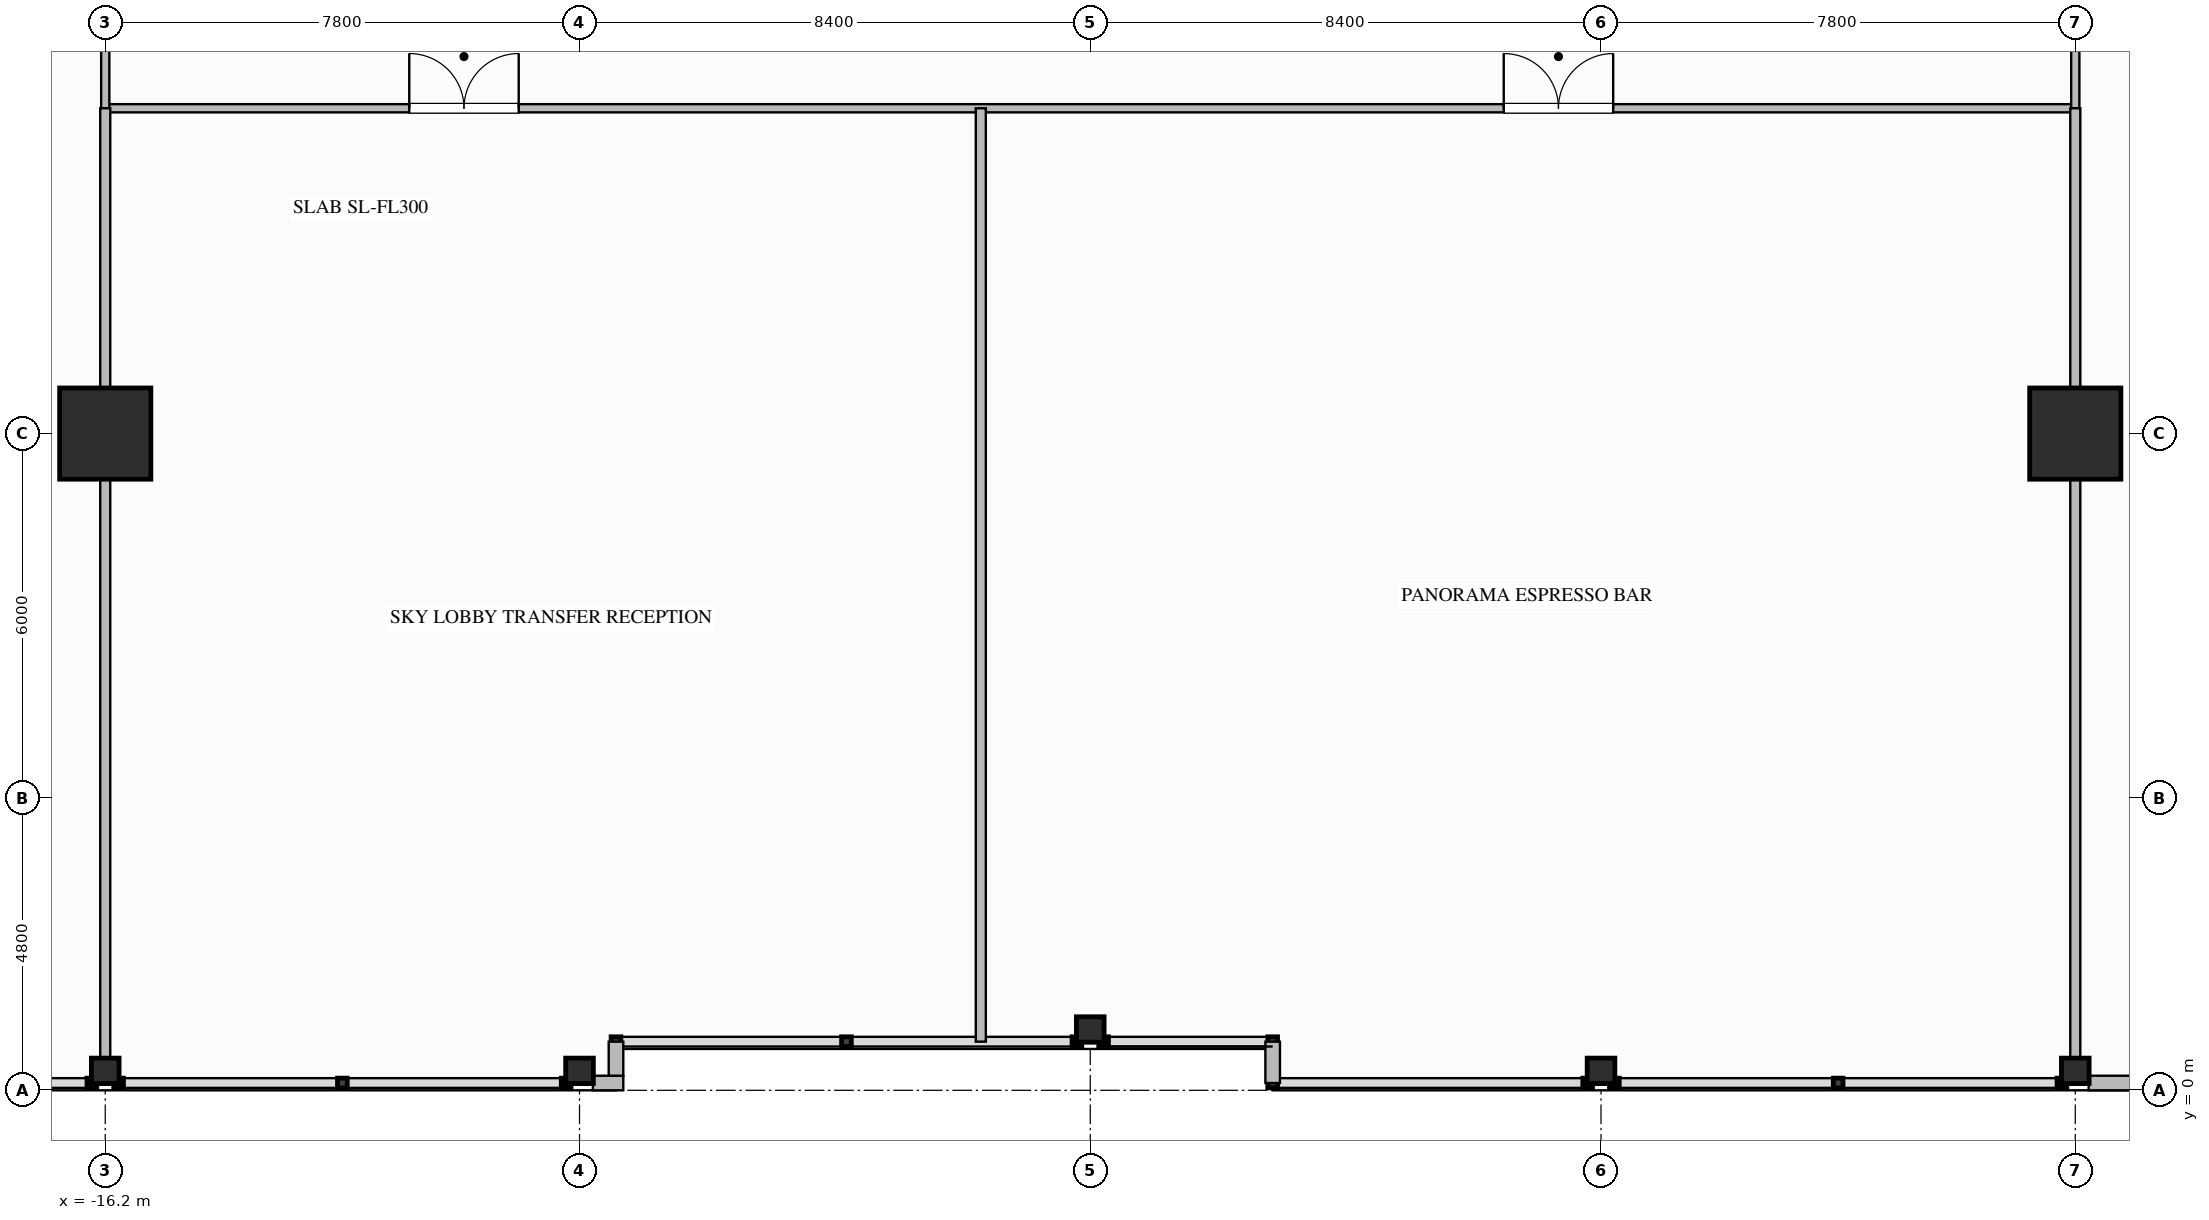
"""IFC4 building model, lengths in metres.
Left out: names, types, materials, properties, quantities, classifications, styles, units other than length and angle.
Written with IfcOpenShell. Run it as: python <this file> out.ifc"""

import sys

from ifc_helpers import new_model, si_unit, direction, frame, frame_2d, origin, origin_2d, place, context, subcontext, project, spatial, rectangle, i_section, extrude, element, fill, save


model = new_model("IFC4")
c1 = context("Model", 3, precision=1e-05, world=origin(), true_north=direction((0.0, 1.0)))
c2 = subcontext(c1, "Body", "Model", "MODEL_VIEW")
j1 = project(units=[si_unit("LENGTHUNIT", "METRE"), si_unit("PLANEANGLEUNIT", "RADIAN")], contexts=[c1])
p1 = place(None, origin())
s1 = spatial("IfcSite", under=j1, at=p1, CompositionType="ELEMENT")
p2 = place(p1, origin())
s2 = spatial("IfcBuilding", under=s1, at=p2, CompositionType="ELEMENT")
p3 = place(p2, frame((0.0, 0.0, 87.2)))
s3 = spatial("IfcBuildingStorey", under=s2, at=p3, CompositionType="ELEMENT", Elevation=87.2)
for number, where, z_axis, x_axis in (
    (1, (-16.2, 10.8, 0.0), (0.0, 0.0, 1.0), (1.0, 0.0, 0.0)),
    (2, (16.2, 10.8, 0.0), (0.0, 0.0, 1.0), (1.0, 0.0, 0.0)),
):
    element("IfcColumn", number, at=place(p3, frame(where, z_axis=z_axis, x_axis=x_axis)), inside=s3, PredefinedType="COLUMN", context=c2, shape_type="SweptSolid", body=[
        extrude(rectangle(XDim=1.5, YDim=1.5, at=origin_2d()), origin(), (0.0, 0.0, 1.0), 4.6),
    ])
for number, where, z_axis, x_axis in (
    (3, (-16.2, 0.32, 0.0), (0.0, 0.0, 1.0), (0.0, 1.0, 0.0)),
    (4, (-8.4, 0.32, 0.0), (0.0, 0.0, 1.0), (0.0, 1.0, 0.0)),
    (5, (0.0, 1.0, 0.0), (0.0, 0.0, 1.0), (0.0, 1.0, 0.0)),
    (6, (8.4, 0.32, 0.0), (0.0, 0.0, 1.0), (0.0, 1.0, 0.0)),
    (7, (16.2, 0.32, 0.0), (0.0, 0.0, 1.0), (0.0, 1.0, 0.0)),
):
    element("IfcColumn", number, at=place(p3, frame(where, z_axis=z_axis, x_axis=x_axis)), inside=s3, PredefinedType="COLUMN", context=c2, shape_type="SweptSolid", body=[
        extrude(i_section(OverallWidth=0.418, OverallDepth=0.455, WebThickness=0.042, FlangeThickness=0.068, FilletRadius=0.03, at=origin_2d()), origin(), (0.0, 0.0, 1.0), 4.597),
    ])
p4 = place(p3, frame((17.82, 0.12, 0.0), z_axis=(0.0, 0.0, 1.0), x_axis=(-1.0, 0.0, 0.0)))
e8 = element("IfcWall", 8, at=p4, inside=s3, PredefinedType="STANDARD", context=c2, shape_type="SweptSolid", body=[
    extrude(rectangle(XDim=1.4, YDim=0.24, at=frame_2d((0.7, 0.0))), origin(), (0.0, 0.0, 1.0), 4.34),
])
p5 = place(p3, frame((-7.68, 0.12, 0.0), z_axis=(0.0, 0.0, 1.0), x_axis=(-1.0, 0.0, 0.0)))
e9 = element("IfcWall", 9, at=p5, inside=s3, PredefinedType="STANDARD", context=c2, shape_type="SweptSolid", body=[
    extrude(rectangle(XDim=0.5, YDim=0.24, at=frame_2d((0.25, 0.0))), origin(), (0.0, 0.0, 1.0), 4.34),
])
p6 = place(p3, frame((3.0, 0.12, 0.0), z_axis=(0.0, 0.0, 1.0), x_axis=(0.0, 1.0, 0.0)))
e10 = element("IfcWall", 10, at=p6, inside=s3, PredefinedType="STANDARD", context=c2, shape_type="SweptSolid", body=[
    extrude(rectangle(XDim=0.68, YDim=0.24, at=frame_2d((0.34, 0.0))), origin(), (0.0, 0.0, 1.0), 4.34),
])
p7 = place(p3, frame((-7.8, 0.8, 0.0), z_axis=(0.0, 0.0, 1.0), x_axis=(0.0, -1.0, 0.0)))
e11 = element("IfcWall", 11, at=p7, inside=s3, PredefinedType="STANDARD", context=c2, shape_type="SweptSolid", body=[
    extrude(rectangle(XDim=0.56, YDim=0.24, at=frame_2d((0.28, 0.0))), origin(), (0.0, 0.0, 1.0), 4.34),
])
p8 = place(p3, frame((-16.2, 16.15, 0.0), z_axis=(0.0, 0.0, 1.0), x_axis=(1.0, 0.0, 0.0)))
e12 = element("IfcWall", 12, at=p8, inside=s3, PredefinedType="PARTITIONING", context=c2, shape_type="SweptSolid", body=[
    extrude(rectangle(XDim=32.4, YDim=0.135, at=frame_2d((16.2, 0.0))), origin(), (0.0, 0.0, 1.0), 4.34),
])
p9 = place(p8, frame((5.0, 0.0, 0.0)))
e13 = element("IfcOpeningElement", 13, at=p9, cuts=e12, PredefinedType="OPENING", context=c2, shape_type="SweptSolid", body=[
    extrude(rectangle(XDim=1.8, YDim=2.35, at=frame_2d((0.9, 1.175))), frame((0.0, 0.077, 0.0), z_axis=(0.0, -1.0, 0.0), x_axis=(1.0, 0.0, 0.0)), (0.0, 0.0, 1.0), 0.155),
])
p10 = place(p8, frame((23.0, 0.0, 0.0)))
e14 = element("IfcOpeningElement", 14, at=p10, cuts=e12, PredefinedType="OPENING", context=c2, shape_type="SweptSolid", body=[
    extrude(rectangle(XDim=1.8, YDim=2.35, at=frame_2d((0.9, 1.175))), frame((0.0, 0.077, 0.0), z_axis=(0.0, -1.0, 0.0), x_axis=(1.0, 0.0, 0.0)), (0.0, 0.0, 1.0), 0.155),
])
for number, where, z_axis, x_axis in (
    (15, (-16.2, 16.15, 0.0), (0.0, 0.0, 1.0), (0.0, 1.0, 0.0)),
    (16, (16.2, 16.15, 0.0), (0.0, 0.0, 1.0), (0.0, 1.0, 0.0)),
):
    element("IfcWall", number, at=place(p3, frame(where, z_axis=z_axis, x_axis=x_axis)), inside=s3, PredefinedType="PARTITIONING", context=c2, shape_type="SweptSolid", body=[
        extrude(rectangle(XDim=2.15, YDim=0.135, at=frame_2d((1.075, 0.0))), origin(), (0.0, 0.0, 1.0), 3.552),
    ])
for number, where, z_axis, x_axis in (
    (17, (-16.2, 0.12, 0.0), (0.0, 0.0, 1.0), (0.0, 1.0, 0.0)),
    (18, (16.2, 0.12, 0.0), (0.0, 0.0, 1.0), (0.0, 1.0, 0.0)),
):
    element("IfcWall", number, at=place(p3, frame(where, z_axis=z_axis, x_axis=x_axis)), inside=s3, PredefinedType="PARTITIONING", context=c2, shape_type="SweptSolid", body=[
        extrude(rectangle(XDim=16.03, YDim=0.165, at=frame_2d((8.015, 0.0))), origin(), (0.0, 0.0, 1.0), 3.552),
    ])
p11 = place(p3, frame((-1.8, 0.8, 0.0), z_axis=(0.0, 0.0, 1.0), x_axis=(0.0, 1.0, 0.0)))
e19 = element("IfcWall", 19, at=p11, inside=s3, PredefinedType="PARTITIONING", context=c2, shape_type="SweptSolid", body=[
    extrude(rectangle(XDim=15.35, YDim=0.165, at=frame_2d((7.675, 0.0))), origin(), (0.0, 0.0, 1.0), 4.34),
])
p12 = place(p9, origin())
e20 = element("IfcDoor", 20, at=p12, inside=s3, OperationType="DOUBLE_DOOR_SINGLE_SWING", PredefinedType="DOOR", context=c2, shape_type="SweptSolid", body=[
    extrude(rectangle(XDim=1.8, YDim=2.35, at=frame_2d((0.9, 1.175))), frame((0.0, 0.025, 0.0), z_axis=(0.0, -1.0, 0.0), x_axis=(1.0, 0.0, 0.0)), (0.0, 0.0, 1.0), 0.05),
])
fill(e13, e20)
p13 = place(p10, origin())
e21 = element("IfcDoor", 21, at=p13, inside=s3, OperationType="DOUBLE_DOOR_SINGLE_SWING", PredefinedType="DOOR", context=c2, shape_type="SweptSolid", body=[
    extrude(rectangle(XDim=1.8, YDim=2.35, at=frame_2d((0.9, 1.175))), frame((0.0, 0.025, 0.0), z_axis=(0.0, -1.0, 0.0), x_axis=(1.0, 0.0, 0.0)), (0.0, 0.0, 1.0), 0.05),
])
fill(e14, e21)
save(model, sys.argv[1])
